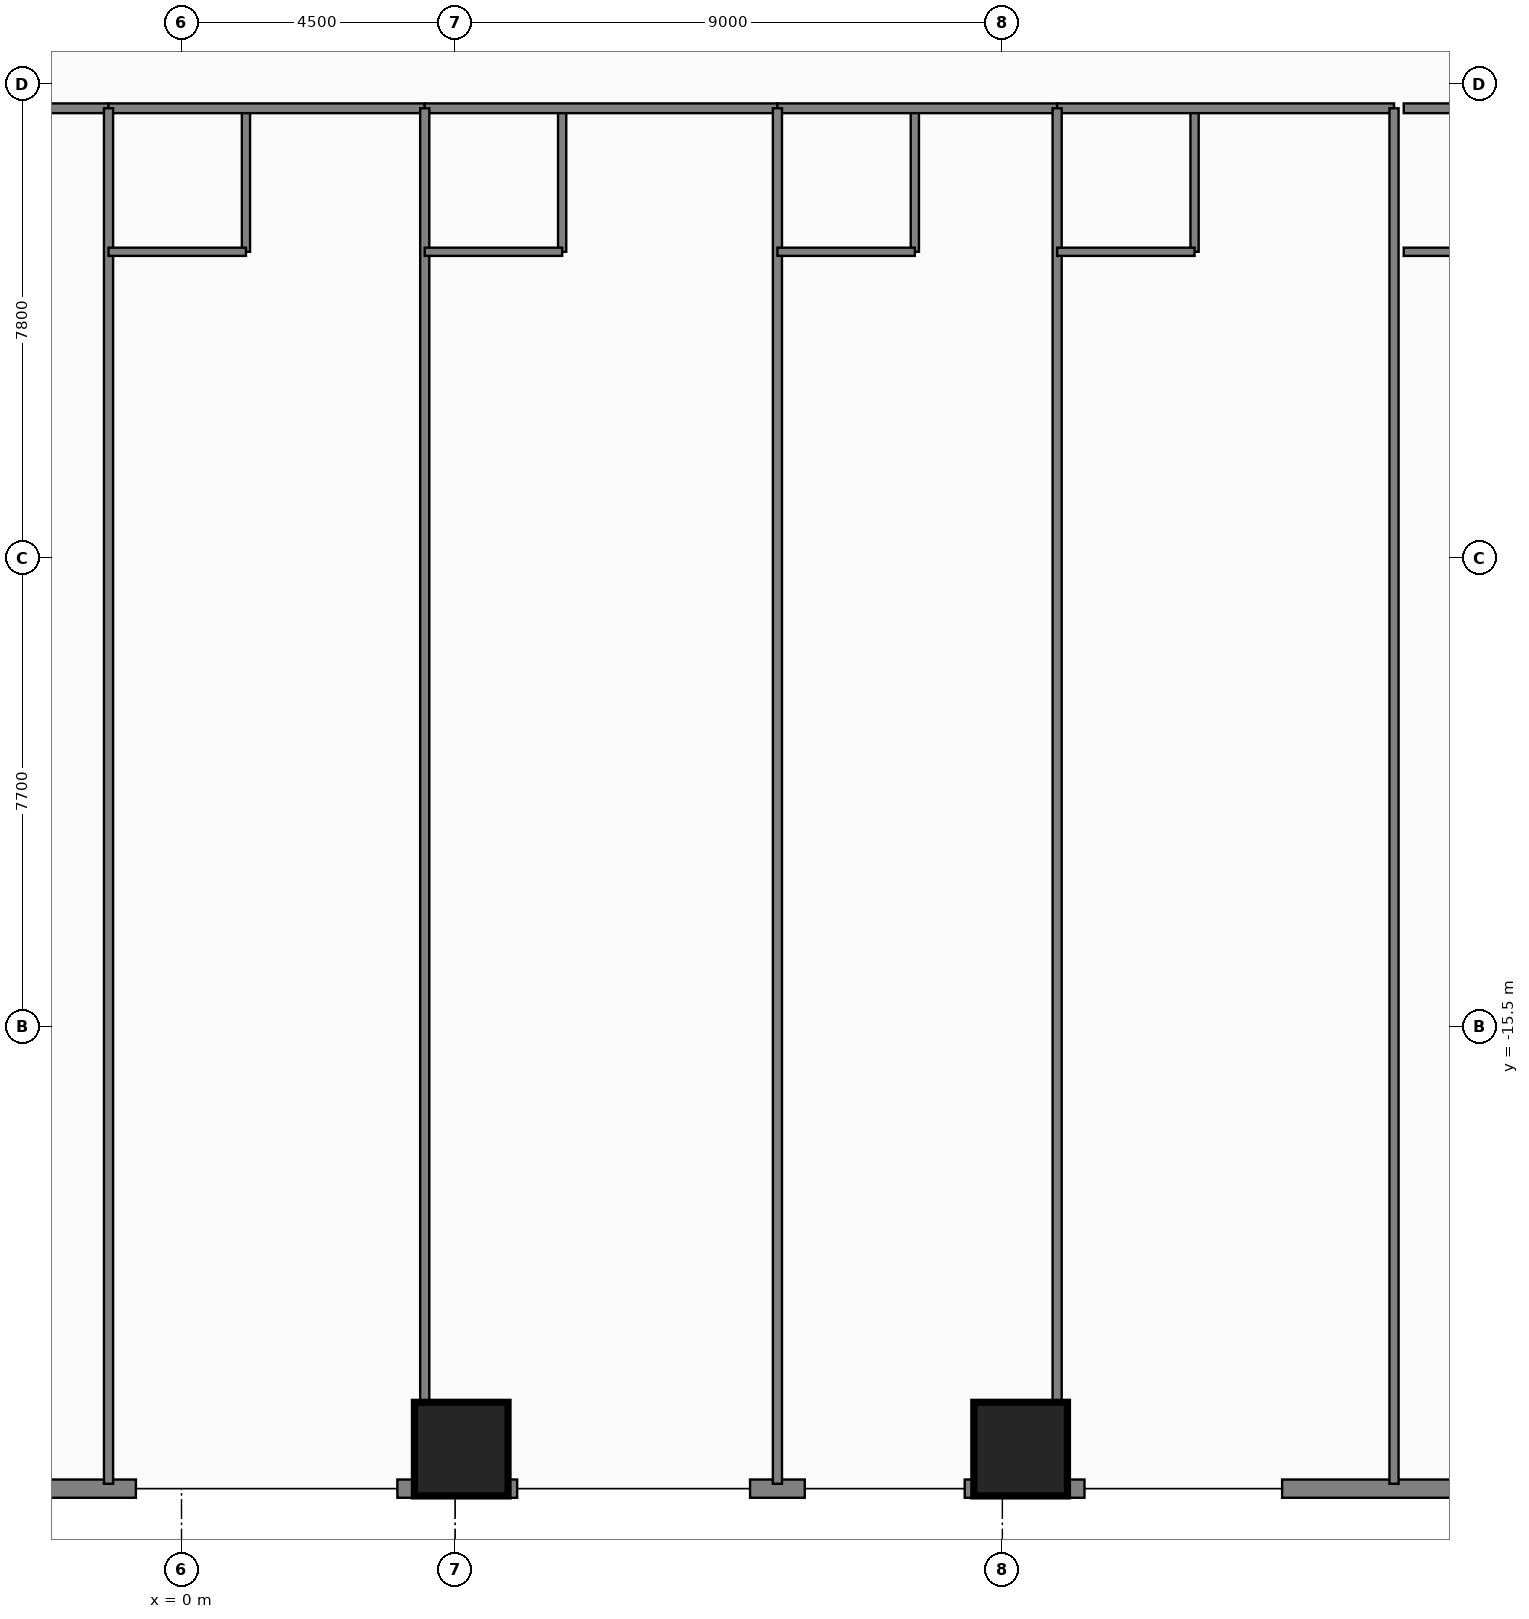
"""IFC4 building model, lengths in metres.
Left out: names, types, materials, properties, quantities, classifications, styles, units other than length and angle.
Written with IfcOpenShell. Run it as: python <this file> out.ifc"""

import sys

from ifc_helpers import new_model, si_unit, direction, frame, frame_2d, origin, origin_2d, place, context, subcontext, project, spatial, rectangle, extrude, element, fill, save


model = new_model("IFC4")
c1 = context("Model", 3, precision=1e-05, world=origin(), true_north=direction((0.0, 1.0)))
c2 = subcontext(c1, "Body", "Model", "MODEL_VIEW")
j1 = project(units=[si_unit("LENGTHUNIT", "METRE"), si_unit("PLANEANGLEUNIT", "RADIAN")], contexts=[c1])
p1 = place(None, origin())
s1 = spatial("IfcSite", under=j1, at=p1, CompositionType="ELEMENT")
p2 = place(p1, origin())
s2 = spatial("IfcBuilding", under=s1, at=p2, CompositionType="ELEMENT")
p3 = place(p2, frame((0.0, 0.0, 27.6)))
s3 = spatial("IfcBuildingStorey", under=s2, at=p3, CompositionType="ELEMENT", Elevation=27.6)
for number, where, z_axis, x_axis in (
    (1, (4.6, -22.45, 0.0), (0.0, 0.0, 1.0), (1.0, 0.0, 0.0)),
    (2, (13.8, -22.45, 0.0), (0.0, 0.0, 1.0), (1.0, 0.0, 0.0)),
):
    element("IfcColumn", number, at=place(p3, frame(where, z_axis=z_axis, x_axis=x_axis)), inside=s3, PredefinedType="COLUMN", context=c2, shape_type="SweptSolid", body=[
        extrude(rectangle(XDim=1.5, YDim=1.5, at=origin_2d()), origin(), (0.0, 0.0, 1.0), 3.65),
    ])
p4 = place(p3, frame((22.1, -23.1, 0.0), z_axis=(0.0, 0.0, 1.0), x_axis=(-1.0, 0.0, 0.0)))
e3 = element("IfcWall", 3, at=p4, inside=s3, PredefinedType="STANDARD", context=c2, shape_type="SweptSolid", body=[
    extrude(rectangle(XDim=4.0, YDim=0.3, at=frame_2d((2.0, 0.0))), origin(), (0.0, 0.0, 1.0), 3.43),
])
p5 = place(p4, frame((0.565, 0.0, 0.95)))
e4 = element("IfcOpeningElement", 4, at=p5, cuts=e3, PredefinedType="OPENING", context=c2, shape_type="SweptSolid", body=[
    extrude(rectangle(XDim=1.15, YDim=1.55, at=frame_2d((0.575, 0.775))), frame((0.0, 0.16, 0.0), z_axis=(0.0, -1.0, 0.0), x_axis=(1.0, 0.0, 0.0)), (0.0, 0.0, 1.0), 0.32),
])
p6 = place(p3, frame((14.85, -23.1, 0.0), z_axis=(0.0, 0.0, 1.0), x_axis=(-1.0, 0.0, 0.0)))
e5 = element("IfcWall", 5, at=p6, inside=s3, PredefinedType="STANDARD", context=c2, shape_type="SweptSolid", body=[
    extrude(rectangle(XDim=1.97, YDim=0.3, at=frame_2d((0.985, 0.0))), origin(), (0.0, 0.0, 1.0), 3.43),
])
p7 = place(p3, frame((10.25, -23.1, 0.0), z_axis=(0.0, 0.0, 1.0), x_axis=(-1.0, 0.0, 0.0)))
e6 = element("IfcWall", 6, at=p7, inside=s3, PredefinedType="STANDARD", context=c2, shape_type="SweptSolid", body=[
    extrude(rectangle(XDim=0.9, YDim=0.3, at=frame_2d((0.45, 0.0))), origin(), (0.0, 0.0, 1.0), 3.43),
])
p8 = place(p3, frame((5.52, -23.1, 0.0), z_axis=(0.0, 0.0, 1.0), x_axis=(-1.0, 0.0, 0.0)))
e7 = element("IfcWall", 7, at=p8, inside=s3, PredefinedType="STANDARD", context=c2, shape_type="SweptSolid", body=[
    extrude(rectangle(XDim=1.97, YDim=0.3, at=frame_2d((0.985, 0.0))), origin(), (0.0, 0.0, 1.0), 3.43),
])
p9 = place(p3, frame((-0.75, -23.1, 0.0), z_axis=(0.0, 0.0, 1.0), x_axis=(-1.0, 0.0, 0.0)))
e8 = element("IfcWall", 8, at=p9, inside=s3, PredefinedType="STANDARD", context=c2, shape_type="SweptSolid", body=[
    extrude(rectangle(XDim=13.97, YDim=0.3, at=frame_2d((6.985, 0.0))), origin(), (0.0, 0.0, 1.0), 3.43),
])
p10 = place(p9, frame((8.053, 0.0, 0.0)))
e9 = element("IfcOpeningElement", 9, at=p10, cuts=e8, PredefinedType="OPENING", context=c2, shape_type="SweptSolid", body=[
    extrude(rectangle(XDim=1.05, YDim=2.2, at=frame_2d((0.525, 1.1))), frame((0.0, 0.16, 0.0), z_axis=(0.0, -1.0, 0.0), x_axis=(1.0, 0.0, 0.0)), (0.0, 0.0, 1.0), 0.32),
])
p11 = place(p9, frame((1.06, 0.0, 0.85)))
e10 = element("IfcOpeningElement", 10, at=p11, cuts=e8, PredefinedType="OPENING", context=c2, shape_type="SweptSolid", body=[
    extrude(rectangle(XDim=1.6, YDim=1.8, at=frame_2d((0.8, 0.9))), frame((0.0, 0.16, 0.0), z_axis=(0.0, -1.0, 0.0), x_axis=(1.0, 0.0, 0.0)), (0.0, 0.0, 1.0), 0.32),
])
p12 = place(p9, frame((4.865, 0.0, 0.95)))
e11 = element("IfcOpeningElement", 11, at=p12, cuts=e8, PredefinedType="OPENING", context=c2, shape_type="SweptSolid", body=[
    extrude(rectangle(XDim=1.15, YDim=1.55, at=frame_2d((0.575, 0.775))), frame((0.0, 0.16, 0.0), z_axis=(0.0, -1.0, 0.0), x_axis=(1.0, 0.0, 0.0)), (0.0, 0.0, 1.0), 0.32),
])
p13 = place(p9, frame((9.842, 0.0, 0.85)))
e12 = element("IfcOpeningElement", 12, at=p13, cuts=e8, PredefinedType="OPENING", context=c2, shape_type="SweptSolid", body=[
    extrude(rectangle(XDim=1.6, YDim=1.8, at=frame_2d((0.8, 0.9))), frame((0.0, 0.16, 0.0), z_axis=(0.0, -1.0, 0.0), x_axis=(1.0, 0.0, 0.0)), (0.0, 0.0, 1.0), 0.32),
])
p14 = place(p3, frame((-7.2, -0.4, 0.0), z_axis=(0.0, 0.0, 1.0), x_axis=(1.0, 0.0, 0.0)))
e13 = element("IfcWall", 13, at=p14, inside=s3, PredefinedType="PARTITIONING", context=c2, shape_type="SweptSolid", body=[
    extrude(rectangle(XDim=6.0, YDim=0.16, at=frame_2d((3.0, 0.0))), origin(), (0.0, 0.0, 1.0), 3.43),
])
p15 = place(p14, frame((3.65, 0.0, 0.0)))
e14 = element("IfcOpeningElement", 14, at=p15, cuts=e13, PredefinedType="OPENING", context=c2, shape_type="SweptSolid", body=[
    extrude(rectangle(XDim=1.0, YDim=2.15, at=frame_2d((0.5, 1.075))), frame((0.0, 0.09, 0.0), z_axis=(0.0, -1.0, 0.0), x_axis=(1.0, 0.0, 0.0)), (0.0, 0.0, 1.0), 0.18),
])
p16 = place(p3, frame((1.06, -2.76, 0.0), z_axis=(0.0, 0.0, 1.0), x_axis=(0.0, 1.0, 0.0)))
e15 = element("IfcWall", 15, at=p16, inside=s3, PredefinedType="PLUMBINGWALL", context=c2, shape_type="SweptSolid", body=[
    extrude(rectangle(XDim=2.36, YDim=0.135, at=frame_2d((1.18, 0.0))), origin(), (0.0, 0.0, 1.0), 3.43),
])
p17 = place(p16, frame((0.65, 0.0, 0.0)))
e16 = element("IfcOpeningElement", 16, at=p17, cuts=e15, PredefinedType="OPENING", context=c2, shape_type="SweptSolid", body=[
    extrude(rectangle(XDim=0.85, YDim=2.1, at=frame_2d((0.425, 1.05))), frame((0.0, 0.077, 0.0), z_axis=(0.0, -1.0, 0.0), x_axis=(1.0, 0.0, 0.0)), (0.0, 0.0, 1.0), 0.155),
])
p18 = place(p3, frame((-1.2, -0.4, 0.0), z_axis=(0.0, 0.0, 1.0), x_axis=(1.0, 0.0, 0.0)))
e17 = element("IfcWall", 17, at=p18, inside=s3, PredefinedType="PARTITIONING", context=c2, shape_type="SweptSolid", body=[
    extrude(rectangle(XDim=5.2, YDim=0.16, at=frame_2d((2.6, 0.0))), origin(), (0.0, 0.0, 1.0), 3.43),
])
p19 = place(p18, frame((3.25, 0.0, 0.0)))
e18 = element("IfcOpeningElement", 18, at=p19, cuts=e17, PredefinedType="OPENING", context=c2, shape_type="SweptSolid", body=[
    extrude(rectangle(XDim=1.0, YDim=2.15, at=frame_2d((0.5, 1.075))), frame((0.0, 0.09, 0.0), z_axis=(0.0, -1.0, 0.0), x_axis=(1.0, 0.0, 0.0)), (0.0, 0.0, 1.0), 0.18),
])
p20 = place(p3, frame((6.26, -2.76, 0.0), z_axis=(0.0, 0.0, 1.0), x_axis=(0.0, 1.0, 0.0)))
e19 = element("IfcWall", 19, at=p20, inside=s3, PredefinedType="PLUMBINGWALL", context=c2, shape_type="SweptSolid", body=[
    extrude(rectangle(XDim=2.36, YDim=0.135, at=frame_2d((1.18, 0.0))), origin(), (0.0, 0.0, 1.0), 3.43),
])
p21 = place(p20, frame((0.65, 0.0, 0.0)))
e20 = element("IfcOpeningElement", 20, at=p21, cuts=e19, PredefinedType="OPENING", context=c2, shape_type="SweptSolid", body=[
    extrude(rectangle(XDim=0.85, YDim=2.1, at=frame_2d((0.425, 1.05))), frame((0.0, 0.077, 0.0), z_axis=(0.0, -1.0, 0.0), x_axis=(1.0, 0.0, 0.0)), (0.0, 0.0, 1.0), 0.155),
])
p22 = place(p3, frame((4.0, -0.4, 0.0), z_axis=(0.0, 0.0, 1.0), x_axis=(1.0, 0.0, 0.0)))
e21 = element("IfcWall", 21, at=p22, inside=s3, PredefinedType="PARTITIONING", context=c2, shape_type="SweptSolid", body=[
    extrude(rectangle(XDim=5.8, YDim=0.16, at=frame_2d((2.9, 0.0))), origin(), (0.0, 0.0, 1.0), 3.43),
])
p23 = place(p22, frame((3.55, 0.0, 0.0)))
e22 = element("IfcOpeningElement", 22, at=p23, cuts=e21, PredefinedType="OPENING", context=c2, shape_type="SweptSolid", body=[
    extrude(rectangle(XDim=1.0, YDim=2.15, at=frame_2d((0.5, 1.075))), frame((0.0, 0.09, 0.0), z_axis=(0.0, -1.0, 0.0), x_axis=(1.0, 0.0, 0.0)), (0.0, 0.0, 1.0), 0.18),
])
p24 = place(p3, frame((12.06, -2.76, 0.0), z_axis=(0.0, 0.0, 1.0), x_axis=(0.0, 1.0, 0.0)))
e23 = element("IfcWall", 23, at=p24, inside=s3, PredefinedType="PLUMBINGWALL", context=c2, shape_type="SweptSolid", body=[
    extrude(rectangle(XDim=2.36, YDim=0.135, at=frame_2d((1.18, 0.0))), origin(), (0.0, 0.0, 1.0), 3.43),
])
p25 = place(p24, frame((0.65, 0.0, 0.0)))
e24 = element("IfcOpeningElement", 24, at=p25, cuts=e23, PredefinedType="OPENING", context=c2, shape_type="SweptSolid", body=[
    extrude(rectangle(XDim=0.85, YDim=2.1, at=frame_2d((0.425, 1.05))), frame((0.0, 0.077, 0.0), z_axis=(0.0, -1.0, 0.0), x_axis=(1.0, 0.0, 0.0)), (0.0, 0.0, 1.0), 0.155),
])
p26 = place(p3, frame((9.8, -0.4, 0.0), z_axis=(0.0, 0.0, 1.0), x_axis=(1.0, 0.0, 0.0)))
e25 = element("IfcWall", 25, at=p26, inside=s3, PredefinedType="PARTITIONING", context=c2, shape_type="SweptSolid", body=[
    extrude(rectangle(XDim=4.6, YDim=0.16, at=frame_2d((2.3, 0.0))), origin(), (0.0, 0.0, 1.0), 3.43),
])
p27 = place(p26, frame((2.95, 0.0, 0.0)))
e26 = element("IfcOpeningElement", 26, at=p27, cuts=e25, PredefinedType="OPENING", context=c2, shape_type="SweptSolid", body=[
    extrude(rectangle(XDim=1.0, YDim=2.15, at=frame_2d((0.5, 1.075))), frame((0.0, 0.09, 0.0), z_axis=(0.0, -1.0, 0.0), x_axis=(1.0, 0.0, 0.0)), (0.0, 0.0, 1.0), 0.18),
])
p28 = place(p3, frame((16.66, -2.76, 0.0), z_axis=(0.0, 0.0, 1.0), x_axis=(0.0, 1.0, 0.0)))
e27 = element("IfcWall", 27, at=p28, inside=s3, PredefinedType="PLUMBINGWALL", context=c2, shape_type="SweptSolid", body=[
    extrude(rectangle(XDim=2.36, YDim=0.135, at=frame_2d((1.18, 0.0))), origin(), (0.0, 0.0, 1.0), 3.43),
])
p29 = place(p28, frame((0.65, 0.0, 0.0)))
e28 = element("IfcOpeningElement", 28, at=p29, cuts=e27, PredefinedType="OPENING", context=c2, shape_type="SweptSolid", body=[
    extrude(rectangle(XDim=0.85, YDim=2.1, at=frame_2d((0.425, 1.05))), frame((0.0, 0.077, 0.0), z_axis=(0.0, -1.0, 0.0), x_axis=(1.0, 0.0, 0.0)), (0.0, 0.0, 1.0), 0.155),
])
p30 = place(p3, frame((14.4, -0.4, 0.0), z_axis=(0.0, 0.0, 1.0), x_axis=(1.0, 0.0, 0.0)))
e29 = element("IfcWall", 29, at=p30, inside=s3, PredefinedType="PARTITIONING", context=c2, shape_type="SweptSolid", body=[
    extrude(rectangle(XDim=5.54, YDim=0.16, at=frame_2d((2.77, 0.0))), origin(), (0.0, 0.0, 1.0), 3.43),
])
p31 = place(p30, frame((3.42, 0.0, 0.0)))
e30 = element("IfcOpeningElement", 30, at=p31, cuts=e29, PredefinedType="OPENING", context=c2, shape_type="SweptSolid", body=[
    extrude(rectangle(XDim=1.0, YDim=2.15, at=frame_2d((0.5, 1.075))), frame((0.0, 0.09, 0.0), z_axis=(0.0, -1.0, 0.0), x_axis=(1.0, 0.0, 0.0)), (0.0, 0.0, 1.0), 0.18),
])
p32 = place(p3, frame((20.1, -0.4, 0.0), z_axis=(0.0, 0.0, 1.0), x_axis=(1.0, 0.0, 0.0)))
e31 = element("IfcWall", 31, at=p32, inside=s3, PredefinedType="PARTITIONING", context=c2, shape_type="SweptSolid", body=[
    extrude(rectangle(XDim=5.54, YDim=0.16, at=frame_2d((2.77, 0.0))), origin(), (0.0, 0.0, 1.0), 3.43),
])
p33 = place(p32, frame((3.42, 0.0, 0.0)))
e32 = element("IfcOpeningElement", 32, at=p33, cuts=e31, PredefinedType="OPENING", context=c2, shape_type="SweptSolid", body=[
    extrude(rectangle(XDim=1.0, YDim=2.15, at=frame_2d((0.5, 1.075))), frame((0.0, 0.09, 0.0), z_axis=(0.0, -1.0, 0.0), x_axis=(1.0, 0.0, 0.0)), (0.0, 0.0, 1.0), 0.18),
])
p34 = place(p3, frame((-1.2, -23.02, 0.0), z_axis=(0.0, 0.0, 1.0), x_axis=(0.0, 1.0, 0.0)))
e33 = element("IfcWall", 33, at=p34, inside=s3, PredefinedType="PARTITIONING", context=c2, shape_type="SweptSolid", body=[
    extrude(rectangle(XDim=22.62, YDim=0.15, at=frame_2d((11.31, 0.0))), origin(), (0.0, 0.0, 1.0), 3.43),
])
p35 = place(p3, frame((-1.2, -2.76, 0.0), z_axis=(0.0, 0.0, 1.0), x_axis=(1.0, 0.0, 0.0)))
e34 = element("IfcWall", 34, at=p35, inside=s3, PredefinedType="PLUMBINGWALL", context=c2, shape_type="SweptSolid", body=[
    extrude(rectangle(XDim=2.26, YDim=0.135, at=frame_2d((1.13, 0.0))), origin(), (0.0, 0.0, 1.0), 3.43),
])
p36 = place(p3, frame((4.0, -23.02, 0.0), z_axis=(0.0, 0.0, 1.0), x_axis=(0.0, 1.0, 0.0)))
e35 = element("IfcWall", 35, at=p36, inside=s3, PredefinedType="PARTITIONING", context=c2, shape_type="SweptSolid", body=[
    extrude(rectangle(XDim=22.62, YDim=0.15, at=frame_2d((11.31, 0.0))), origin(), (0.0, 0.0, 1.0), 3.43),
])
p37 = place(p3, frame((4.0, -2.76, 0.0), z_axis=(0.0, 0.0, 1.0), x_axis=(1.0, 0.0, 0.0)))
e36 = element("IfcWall", 36, at=p37, inside=s3, PredefinedType="PLUMBINGWALL", context=c2, shape_type="SweptSolid", body=[
    extrude(rectangle(XDim=2.26, YDim=0.135, at=frame_2d((1.13, 0.0))), origin(), (0.0, 0.0, 1.0), 3.43),
])
p38 = place(p3, frame((9.8, -23.02, 0.0), z_axis=(0.0, 0.0, 1.0), x_axis=(0.0, 1.0, 0.0)))
e37 = element("IfcWall", 37, at=p38, inside=s3, PredefinedType="PARTITIONING", context=c2, shape_type="SweptSolid", body=[
    extrude(rectangle(XDim=22.62, YDim=0.15, at=frame_2d((11.31, 0.0))), origin(), (0.0, 0.0, 1.0), 3.43),
])
p39 = place(p3, frame((9.8, -2.76, 0.0), z_axis=(0.0, 0.0, 1.0), x_axis=(1.0, 0.0, 0.0)))
e38 = element("IfcWall", 38, at=p39, inside=s3, PredefinedType="PLUMBINGWALL", context=c2, shape_type="SweptSolid", body=[
    extrude(rectangle(XDim=2.26, YDim=0.135, at=frame_2d((1.13, 0.0))), origin(), (0.0, 0.0, 1.0), 3.43),
])
p40 = place(p3, frame((14.4, -23.02, 0.0), z_axis=(0.0, 0.0, 1.0), x_axis=(0.0, 1.0, 0.0)))
e39 = element("IfcWall", 39, at=p40, inside=s3, PredefinedType="PARTITIONING", context=c2, shape_type="SweptSolid", body=[
    extrude(rectangle(XDim=22.62, YDim=0.15, at=frame_2d((11.31, 0.0))), origin(), (0.0, 0.0, 1.0), 3.43),
])
p41 = place(p3, frame((14.4, -2.76, 0.0), z_axis=(0.0, 0.0, 1.0), x_axis=(1.0, 0.0, 0.0)))
e40 = element("IfcWall", 40, at=p41, inside=s3, PredefinedType="PLUMBINGWALL", context=c2, shape_type="SweptSolid", body=[
    extrude(rectangle(XDim=2.26, YDim=0.135, at=frame_2d((1.13, 0.0))), origin(), (0.0, 0.0, 1.0), 3.43),
])
p42 = place(p3, frame((19.94, -23.02, 0.0), z_axis=(0.0, 0.0, 1.0), x_axis=(0.0, 1.0, 0.0)))
e41 = element("IfcWall", 41, at=p42, inside=s3, PredefinedType="PARTITIONING", context=c2, shape_type="SweptSolid", body=[
    extrude(rectangle(XDim=22.62, YDim=0.15, at=frame_2d((11.31, 0.0))), origin(), (0.0, 0.0, 1.0), 3.43),
])
p43 = place(p3, frame((20.1, -2.76, 0.0), z_axis=(0.0, 0.0, 1.0), x_axis=(1.0, 0.0, 0.0)))
e42 = element("IfcWall", 42, at=p43, inside=s3, PredefinedType="PLUMBINGWALL", context=c2, shape_type="SweptSolid", body=[
    extrude(rectangle(XDim=2.26, YDim=0.135, at=frame_2d((1.13, 0.0))), origin(), (0.0, 0.0, 1.0), 3.43),
])
p44 = place(p5, origin())
e43 = element("IfcWindow", 43, at=p44, inside=s3, PartitioningType="SINGLE_PANEL", PredefinedType="WINDOW", context=c2, shape_type="SweptSolid", body=[
    extrude(rectangle(XDim=1.15, YDim=1.55, at=frame_2d((0.575, 0.775))), frame((0.0, 0.03, 0.0), z_axis=(0.0, -1.0, 0.0), x_axis=(1.0, 0.0, 0.0)), (0.0, 0.0, 1.0), 0.06),
])
fill(e4, e43)
p45 = place(p11, origin())
e44 = element("IfcWindow", 44, at=p45, inside=s3, PartitioningType="SINGLE_PANEL", PredefinedType="WINDOW", context=c2, shape_type="SweptSolid", body=[
    extrude(rectangle(XDim=1.6, YDim=1.8, at=frame_2d((0.8, 0.9))), frame((0.0, 0.03, 0.0), z_axis=(0.0, -1.0, 0.0), x_axis=(1.0, 0.0, 0.0)), (0.0, 0.0, 1.0), 0.06),
])
fill(e10, e44)
p46 = place(p17, origin())
e45 = element("IfcDoor", 45, at=p46, inside=s3, OperationType="SINGLE_SWING_LEFT", PredefinedType="DOOR", context=c2, shape_type="SweptSolid", body=[
    extrude(rectangle(XDim=0.85, YDim=2.1, at=frame_2d((0.425, 1.05))), frame((0.0, 0.025, 0.0), z_axis=(0.0, -1.0, 0.0), x_axis=(1.0, 0.0, 0.0)), (0.0, 0.0, 1.0), 0.05),
])
fill(e16, e45)
p47 = place(p19, origin())
e46 = element("IfcDoor", 46, at=p47, inside=s3, OperationType="SINGLE_SWING_RIGHT", PredefinedType="DOOR", context=c2, shape_type="SweptSolid", body=[
    extrude(rectangle(XDim=1.0, YDim=2.15, at=frame_2d((0.5, 1.075))), frame((0.0, 0.025, 0.0), z_axis=(0.0, -1.0, 0.0), x_axis=(1.0, 0.0, 0.0)), (0.0, 0.0, 1.0), 0.05),
])
fill(e18, e46)
p48 = place(p21, origin())
e47 = element("IfcDoor", 47, at=p48, inside=s3, OperationType="SINGLE_SWING_LEFT", PredefinedType="DOOR", context=c2, shape_type="SweptSolid", body=[
    extrude(rectangle(XDim=0.85, YDim=2.1, at=frame_2d((0.425, 1.05))), frame((0.0, 0.025, 0.0), z_axis=(0.0, -1.0, 0.0), x_axis=(1.0, 0.0, 0.0)), (0.0, 0.0, 1.0), 0.05),
])
fill(e20, e47)
p49 = place(p23, origin())
e48 = element("IfcDoor", 48, at=p49, inside=s3, OperationType="SINGLE_SWING_RIGHT", PredefinedType="DOOR", context=c2, shape_type="SweptSolid", body=[
    extrude(rectangle(XDim=1.0, YDim=2.15, at=frame_2d((0.5, 1.075))), frame((0.0, 0.025, 0.0), z_axis=(0.0, -1.0, 0.0), x_axis=(1.0, 0.0, 0.0)), (0.0, 0.0, 1.0), 0.05),
])
fill(e22, e48)
p50 = place(p25, origin())
e49 = element("IfcDoor", 49, at=p50, inside=s3, OperationType="SINGLE_SWING_LEFT", PredefinedType="DOOR", context=c2, shape_type="SweptSolid", body=[
    extrude(rectangle(XDim=0.85, YDim=2.1, at=frame_2d((0.425, 1.05))), frame((0.0, 0.025, 0.0), z_axis=(0.0, -1.0, 0.0), x_axis=(1.0, 0.0, 0.0)), (0.0, 0.0, 1.0), 0.05),
])
fill(e24, e49)
p51 = place(p27, origin())
e50 = element("IfcDoor", 50, at=p51, inside=s3, OperationType="SINGLE_SWING_RIGHT", PredefinedType="DOOR", context=c2, shape_type="SweptSolid", body=[
    extrude(rectangle(XDim=1.0, YDim=2.15, at=frame_2d((0.5, 1.075))), frame((0.0, 0.025, 0.0), z_axis=(0.0, -1.0, 0.0), x_axis=(1.0, 0.0, 0.0)), (0.0, 0.0, 1.0), 0.05),
])
fill(e26, e50)
p52 = place(p29, origin())
e51 = element("IfcDoor", 51, at=p52, inside=s3, OperationType="SINGLE_SWING_LEFT", PredefinedType="DOOR", context=c2, shape_type="SweptSolid", body=[
    extrude(rectangle(XDim=0.85, YDim=2.1, at=frame_2d((0.425, 1.05))), frame((0.0, 0.025, 0.0), z_axis=(0.0, -1.0, 0.0), x_axis=(1.0, 0.0, 0.0)), (0.0, 0.0, 1.0), 0.05),
])
fill(e28, e51)
p53 = place(p31, origin())
e52 = element("IfcDoor", 52, at=p53, inside=s3, OperationType="SINGLE_SWING_RIGHT", PredefinedType="DOOR", context=c2, shape_type="SweptSolid", body=[
    extrude(rectangle(XDim=1.0, YDim=2.15, at=frame_2d((0.5, 1.075))), frame((0.0, 0.025, 0.0), z_axis=(0.0, -1.0, 0.0), x_axis=(1.0, 0.0, 0.0)), (0.0, 0.0, 1.0), 0.05),
])
fill(e30, e52)
save(model, sys.argv[1])
